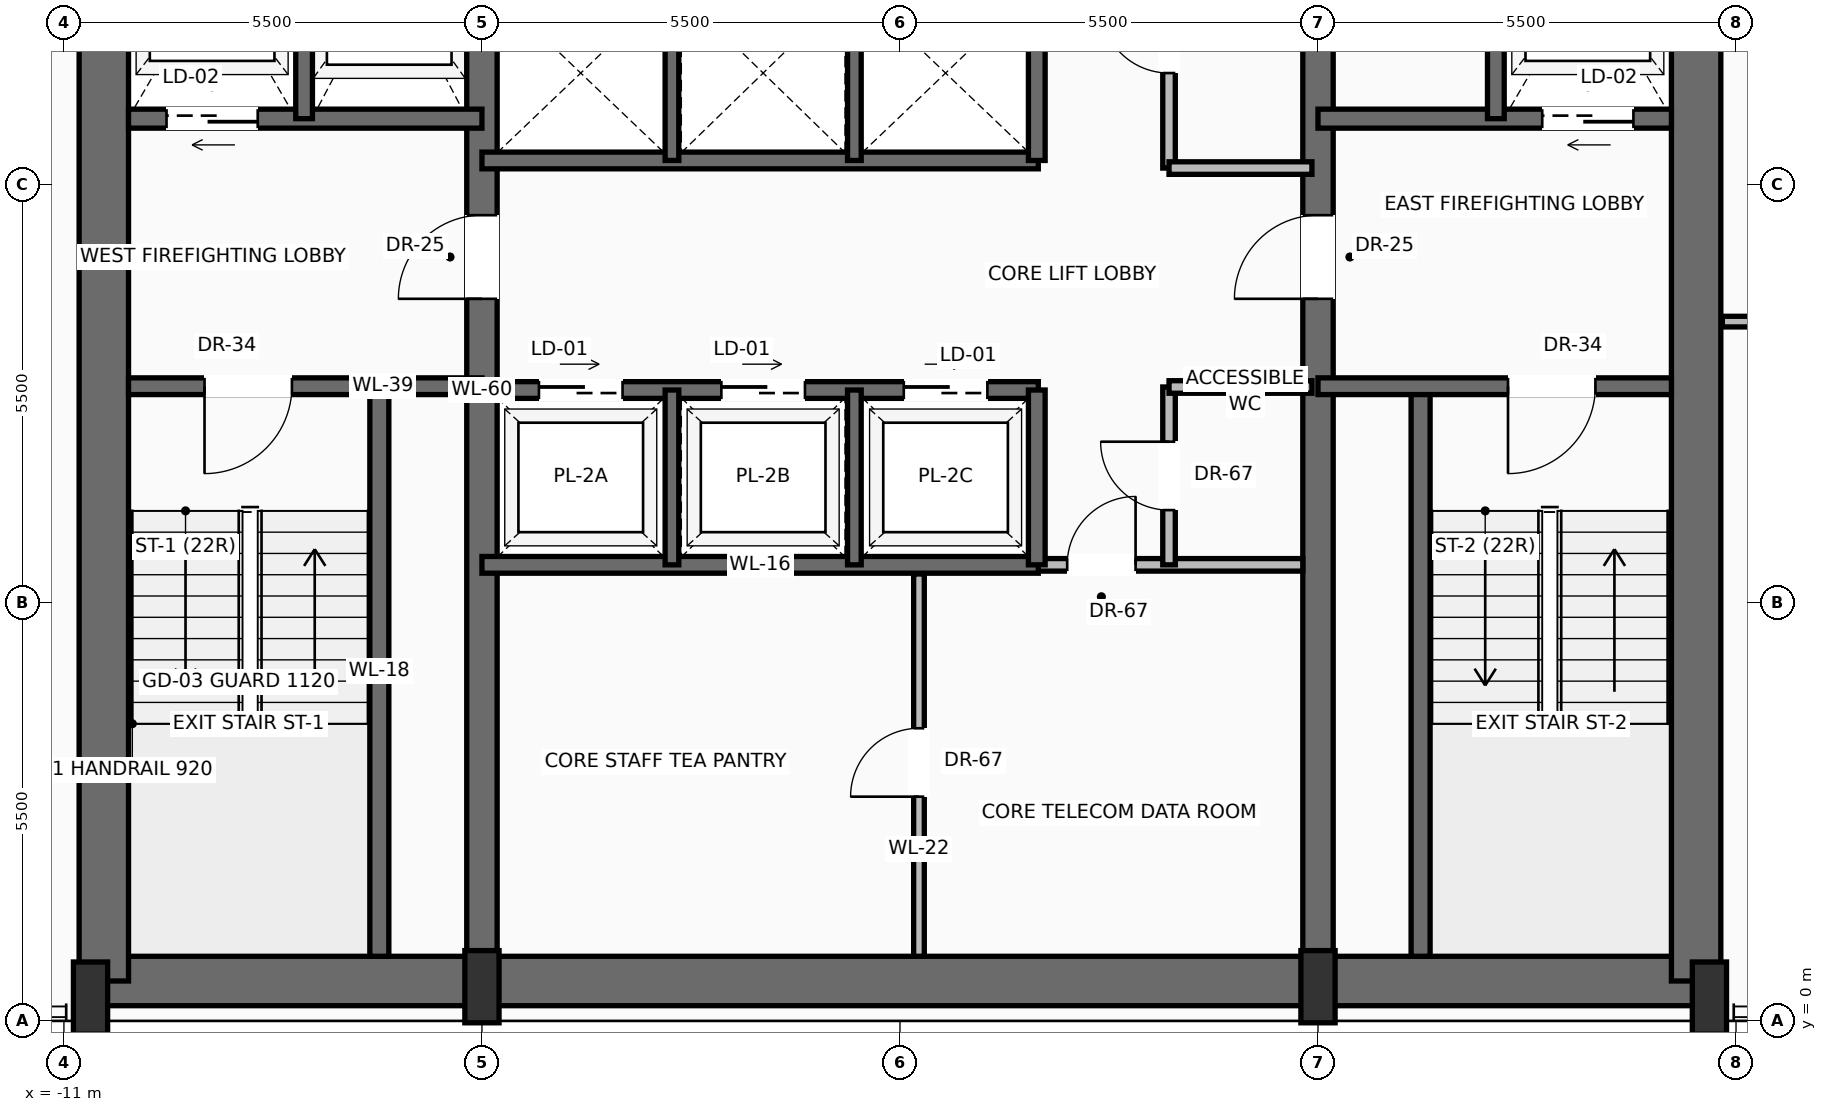
"""IFC4 building model, lengths in metres.
Left out: names, types, materials, properties, quantities, classifications, styles, units other than length and angle.
Written with IfcOpenShell. Run it as: python <this file> out.ifc"""

import sys

from ifc_helpers import new_model, si_unit, direction, frame, frame_2d, origin, origin_2d, place, context, subcontext, project, spatial, rectangle, extrude, source, transform, mapped, element, fill, save


model = new_model("IFC4")
c1 = context("Model", 3, precision=1e-05, world=origin(), true_north=direction((0.0, 1.0)))
c2 = subcontext(c1, "Body", "Model", "MODEL_VIEW")
j1 = project(units=[si_unit("LENGTHUNIT", "METRE"), si_unit("PLANEANGLEUNIT", "RADIAN")], contexts=[c1])
p1 = place(None, origin())
s1 = spatial("IfcSite", under=j1, at=p1, CompositionType="ELEMENT")
p2 = place(p1, origin())
s2 = spatial("IfcBuilding", under=s1, at=p2, CompositionType="ELEMENT")
p3 = place(p2, frame((0.0, 0.0, 171.0)))
s3 = spatial("IfcBuildingStorey", under=s2, at=p3, CompositionType="ELEMENT", Elevation=171.0)
p4 = place(p3, frame((-10.65, 0.525, 0.0), z_axis=(0.0, 0.0, 1.0), x_axis=(1.0, 0.0, 0.0)))
e1 = element("IfcWall", 1, at=p4, inside=s3, PredefinedType="SHEAR", context=c2, shape_type="SweptSolid", body=[
    extrude(rectangle(XDim=21.3, YDim=0.65, at=frame_2d((10.65, 0.0))), origin(), (0.0, 0.0, 1.0), 3.47),
])
for number, where, z_axis, x_axis in (
    (2, (-10.475, 0.525, 0.0), (0.0, 0.0, 1.0), (0.0, 1.0, 0.0)),
    (3, (10.475, 0.525, 0.0), (0.0, 0.0, 1.0), (0.0, 1.0, 0.0)),
):
    element("IfcWall", number, at=place(p3, frame(where, z_axis=z_axis, x_axis=x_axis)), inside=s3, PredefinedType="SHEAR", context=c2, shape_type="SweptSolid", body=[
        extrude(rectangle(XDim=15.55, YDim=0.65, at=frame_2d((7.775, 0.0))), origin(), (0.0, 0.0, 1.0), 3.47),
    ])
p5 = place(p3, frame((-5.5, 0.525, 0.0), z_axis=(0.0, 0.0, 1.0), x_axis=(0.0, 1.0, 0.0)))
e4 = element("IfcWall", 4, at=p5, inside=s3, PredefinedType="SHEAR", context=c2, shape_type="SweptSolid", body=[
    extrude(rectangle(XDim=15.55, YDim=0.4, at=frame_2d((7.775, 0.0))), origin(), (0.0, 0.0, 1.0), 3.47),
])
p6 = place(p5, frame((8.975, 0.0, 0.0)))
e5 = element("IfcOpeningElement", 5, at=p6, cuts=e4, PredefinedType="OPENING", context=c2, shape_type="SweptSolid", body=[
    extrude(rectangle(XDim=1.1, YDim=2.2, at=frame_2d((0.55, 1.1))), frame((0.0, 0.21, 0.0), z_axis=(0.0, -1.0, 0.0), x_axis=(1.0, 0.0, 0.0)), (0.0, 0.0, 1.0), 0.42),
])
p7 = place(p3, frame((5.5, 0.525, 0.0), z_axis=(0.0, 0.0, 1.0), x_axis=(0.0, 1.0, 0.0)))
e6 = element("IfcWall", 6, at=p7, inside=s3, PredefinedType="SHEAR", context=c2, shape_type="SweptSolid", body=[
    extrude(rectangle(XDim=15.55, YDim=0.4, at=frame_2d((7.775, 0.0))), origin(), (0.0, 0.0, 1.0), 3.47),
])
p8 = place(p7, frame((8.975, 0.0, 0.0)))
e7 = element("IfcOpeningElement", 7, at=p8, cuts=e6, PredefinedType="OPENING", context=c2, shape_type="SweptSolid", body=[
    extrude(rectangle(XDim=1.1, YDim=2.2, at=frame_2d((0.55, 1.1))), frame((0.0, 0.21, 0.0), z_axis=(0.0, -1.0, 0.0), x_axis=(1.0, 0.0, 0.0)), (0.0, 0.0, 1.0), 0.42),
])
m1 = source(origin(), c2, "Body", "SweptSolid", [
    extrude(rectangle(XDim=0.45, YDim=0.95, at=origin_2d()), origin(), (0.0, 0.0, 1.0), 3.7),
])
for number, where, z_axis, x_axis in (
    (8, (-10.65, 0.3, 0.0), (0.0, 0.0, 1.0), (1.0, 0.0, 0.0)),
    (9, (-5.5, 0.45, 0.0), (0.0, 0.0, 1.0), (1.0, 0.0, 0.0)),
    (10, (5.5, 0.45, 0.0), (0.0, 0.0, 1.0), (1.0, 0.0, 0.0)),
    (11, (10.65, 0.3, 0.0), (0.0, 0.0, 1.0), (1.0, 0.0, 0.0)),
):
    element("IfcColumn", number, at=place(p3, frame(where, z_axis=z_axis, x_axis=x_axis)), inside=s3, PredefinedType="PILASTER", context=c2, shape_type="MappedRepresentation", body=[
        mapped(m1, transform((0.0, 0.0, 0.0), scale=1.0)),
    ])
p9 = place(p3, frame((-6.85, 0.85, 0.0), z_axis=(0.0, 0.0, 1.0), x_axis=(0.0, 1.0, 0.0)))
e12 = element("IfcWall", 12, at=p9, inside=s3, PredefinedType="SOLIDWALL", context=c2, shape_type="SweptSolid", body=[
    extrude(rectangle(XDim=7.5, YDim=0.25, at=frame_2d((3.75, 0.0))), origin(), (0.0, 0.0, 1.0), 3.47),
])
p10 = place(p3, frame((-5.5, 8.35, 0.0), z_axis=(0.0, 0.0, 1.0), x_axis=(-1.0, 0.0, 0.0)))
e13 = element("IfcWall", 13, at=p10, inside=s3, PredefinedType="SOLIDWALL", context=c2, shape_type="SweptSolid", body=[
    extrude(rectangle(XDim=4.65, YDim=0.22, at=frame_2d((2.325, 0.0))), origin(), (0.0, 0.0, 1.0), 3.47),
])
p11 = place(p10, frame((2.5, 0.0, 0.0)))
e14 = element("IfcOpeningElement", 14, at=p11, cuts=e13, PredefinedType="OPENING", context=c2, shape_type="SweptSolid", body=[
    extrude(rectangle(XDim=1.15, YDim=2.2, at=frame_2d((0.575, 1.1))), frame((0.0, 0.12, 0.0), z_axis=(0.0, -1.0, 0.0), x_axis=(1.0, 0.0, 0.0)), (0.0, 0.0, 1.0), 0.24),
])
p12 = place(p3, frame((-5.5, 11.87, 0.0), z_axis=(0.0, 0.0, 1.0), x_axis=(-1.0, 0.0, 0.0)))
e15 = element("IfcWall", 15, at=p12, inside=s3, PredefinedType="SOLIDWALL", context=c2, shape_type="SweptSolid", body=[
    extrude(rectangle(XDim=4.65, YDim=0.25, at=frame_2d((2.325, 0.0))), origin(), (0.0, 0.0, 1.0), 3.47),
])
p13 = place(p12, frame((2.95, 0.0, 0.0)))
e16 = element("IfcOpeningElement", 16, at=p13, cuts=e15, PredefinedType="OPENING", context=c2, shape_type="SweptSolid", body=[
    extrude(rectangle(XDim=1.2, YDim=2.25, at=frame_2d((0.6, 1.125))), frame((0.0, 0.135, 0.0), z_axis=(0.0, -1.0, 0.0), x_axis=(1.0, 0.0, 0.0)), (0.0, 0.0, 1.0), 0.27),
])
p14 = place(p3, frame((-7.84, 11.87, 0.0), z_axis=(0.0, 0.0, 1.0), x_axis=(0.0, 1.0, 0.0)))
e17 = element("IfcWall", 17, at=p14, inside=s3, PredefinedType="SOLIDWALL", context=c2, shape_type="SweptSolid", body=[
    extrude(rectangle(XDim=3.88, YDim=0.22, at=frame_2d((1.94, 0.0))), origin(), (0.0, 0.0, 1.0), 3.47),
])
p15 = place(p3, frame((6.85, 0.85, 0.0), z_axis=(0.0, 0.0, 1.0), x_axis=(0.0, 1.0, 0.0)))
e18 = element("IfcWall", 18, at=p15, inside=s3, PredefinedType="SOLIDWALL", context=c2, shape_type="SweptSolid", body=[
    extrude(rectangle(XDim=7.5, YDim=0.25, at=frame_2d((3.75, 0.0))), origin(), (0.0, 0.0, 1.0), 3.47),
])
p16 = place(p3, frame((10.15, 8.35, 0.0), z_axis=(0.0, 0.0, 1.0), x_axis=(-1.0, 0.0, 0.0)))
e19 = element("IfcWall", 19, at=p16, inside=s3, PredefinedType="SOLIDWALL", context=c2, shape_type="SweptSolid", body=[
    extrude(rectangle(XDim=4.65, YDim=0.22, at=frame_2d((2.325, 0.0))), origin(), (0.0, 0.0, 1.0), 3.47),
])
p17 = place(p16, frame((1.0, 0.0, 0.0)))
e20 = element("IfcOpeningElement", 20, at=p17, cuts=e19, PredefinedType="OPENING", context=c2, shape_type="SweptSolid", body=[
    extrude(rectangle(XDim=1.15, YDim=2.2, at=frame_2d((0.575, 1.1))), frame((0.0, 0.12, 0.0), z_axis=(0.0, -1.0, 0.0), x_axis=(1.0, 0.0, 0.0)), (0.0, 0.0, 1.0), 0.24),
])
p18 = place(p3, frame((10.15, 11.87, 0.0), z_axis=(0.0, 0.0, 1.0), x_axis=(-1.0, 0.0, 0.0)))
e21 = element("IfcWall", 21, at=p18, inside=s3, PredefinedType="SOLIDWALL", context=c2, shape_type="SweptSolid", body=[
    extrude(rectangle(XDim=4.65, YDim=0.25, at=frame_2d((2.325, 0.0))), origin(), (0.0, 0.0, 1.0), 3.47),
])
p19 = place(p18, frame((0.5, 0.0, 0.0)))
e22 = element("IfcOpeningElement", 22, at=p19, cuts=e21, PredefinedType="OPENING", context=c2, shape_type="SweptSolid", body=[
    extrude(rectangle(XDim=1.2, YDim=2.25, at=frame_2d((0.6, 1.125))), frame((0.0, 0.135, 0.0), z_axis=(0.0, -1.0, 0.0), x_axis=(1.0, 0.0, 0.0)), (0.0, 0.0, 1.0), 0.27),
])
p20 = place(p3, frame((7.84, 11.87, 0.0), z_axis=(0.0, 0.0, 1.0), x_axis=(0.0, 1.0, 0.0)))
e23 = element("IfcWall", 23, at=p20, inside=s3, PredefinedType="SOLIDWALL", context=c2, shape_type="SweptSolid", body=[
    extrude(rectangle(XDim=3.88, YDim=0.22, at=frame_2d((1.94, 0.0))), origin(), (0.0, 0.0, 1.0), 3.47),
])
p21 = place(p3, frame((1.82, 6.0, 0.0), z_axis=(0.0, 0.0, 1.0), x_axis=(1.0, 0.0, 0.0)))
e24 = element("IfcWall", 24, at=p21, inside=s3, PredefinedType="PARTITIONING", context=c2, shape_type="SweptSolid", body=[
    extrude(rectangle(XDim=3.48, YDim=0.165, at=frame_2d((1.74, 0.0))), origin(), (0.0, 0.0, 1.0), 3.462),
])
p22 = place(p21, frame((0.38, 0.0, 0.0)))
e25 = element("IfcOpeningElement", 25, at=p22, cuts=e24, PredefinedType="OPENING", context=c2, shape_type="SweptSolid", body=[
    extrude(rectangle(XDim=0.9, YDim=2.1, at=frame_2d((0.45, 1.05))), frame((0.0, 0.093, 0.0), z_axis=(0.0, -1.0, 0.0), x_axis=(1.0, 0.0, 0.0)), (0.0, 0.0, 1.0), 0.185),
])
p23 = place(p3, frame((0.25, 0.85, 0.0), z_axis=(0.0, 0.0, 1.0), x_axis=(0.0, 1.0, 0.0)))
e26 = element("IfcWall", 26, at=p23, inside=s3, PredefinedType="PARTITIONING", context=c2, shape_type="SweptSolid", body=[
    extrude(rectangle(XDim=5.03, YDim=0.14, at=frame_2d((2.515, 0.0))), origin(), (0.0, 0.0, 1.0), 3.462),
])
p24 = place(p23, frame((2.1, 0.0, 0.0)))
e27 = element("IfcOpeningElement", 27, at=p24, cuts=e26, PredefinedType="OPENING", context=c2, shape_type="SweptSolid", body=[
    extrude(rectangle(XDim=0.9, YDim=2.1, at=frame_2d((0.45, 1.05))), frame((0.0, 0.08, 0.0), z_axis=(0.0, -1.0, 0.0), x_axis=(1.0, 0.0, 0.0)), (0.0, 0.0, 1.0), 0.16),
])
p25 = place(p3, frame((3.54, 6.0, 0.0), z_axis=(0.0, 0.0, 1.0), x_axis=(0.0, 1.0, 0.0)))
e28 = element("IfcWall", 28, at=p25, inside=s3, PredefinedType="PARTITIONING", context=c2, shape_type="SweptSolid", body=[
    extrude(rectangle(XDim=2.34, YDim=0.165, at=frame_2d((1.17, 0.0))), origin(), (0.0, 0.0, 1.0), 3.462),
])
p26 = place(p25, frame((0.72, 0.0, 0.0)))
e29 = element("IfcOpeningElement", 29, at=p26, cuts=e28, PredefinedType="OPENING", context=c2, shape_type="SweptSolid", body=[
    extrude(rectangle(XDim=0.9, YDim=2.1, at=frame_2d((0.45, 1.05))), frame((0.0, 0.093, 0.0), z_axis=(0.0, -1.0, 0.0), x_axis=(1.0, 0.0, 0.0)), (0.0, 0.0, 1.0), 0.185),
])
p27 = place(p3, frame((3.54, 8.34, 0.0), z_axis=(0.0, 0.0, 1.0), x_axis=(1.0, 0.0, 0.0)))
e30 = element("IfcWall", 30, at=p27, inside=s3, PredefinedType="PARTITIONING", context=c2, shape_type="SweptSolid", body=[
    extrude(rectangle(XDim=1.88, YDim=0.165, at=frame_2d((0.94, 0.0))), origin(), (0.0, 0.0, 1.0), 3.462),
])
p28 = place(p3, frame((-5.5, 6.0, 0.0), z_axis=(0.0, 0.0, 1.0), x_axis=(1.0, 0.0, 0.0)))
e31 = element("IfcWall", 31, at=p28, inside=s3, PredefinedType="SOLIDWALL", context=c2, shape_type="SweptSolid", body=[
    extrude(rectangle(XDim=7.32, YDim=0.22, at=frame_2d((3.66, 0.0))), origin(), (0.0, 0.0, 1.0), 3.47),
])
p29 = place(p3, frame((-5.5, 8.3, 0.0), z_axis=(0.0, 0.0, 1.0), x_axis=(1.0, 0.0, 0.0)))
e32 = element("IfcWall", 32, at=p29, inside=s3, PredefinedType="SOLIDWALL", context=c2, shape_type="SweptSolid", body=[
    extrude(rectangle(XDim=7.32, YDim=0.22, at=frame_2d((3.66, 0.0))), origin(), (0.0, 0.0, 1.0), 3.47),
])
p30 = place(p29, frame((0.75, 0.0, 0.0)))
e33 = element("IfcOpeningElement", 33, at=p30, cuts=e32, PredefinedType="OPENING", context=c2, shape_type="SweptSolid", body=[
    extrude(rectangle(XDim=1.1, YDim=2.2, at=frame_2d((0.55, 1.1))), frame((0.0, 0.12, 0.0), z_axis=(0.0, -1.0, 0.0), x_axis=(1.0, 0.0, 0.0)), (0.0, 0.0, 1.0), 0.24),
])
p31 = place(p29, frame((3.15, 0.0, 0.0)))
e34 = element("IfcOpeningElement", 34, at=p31, cuts=e32, PredefinedType="OPENING", context=c2, shape_type="SweptSolid", body=[
    extrude(rectangle(XDim=1.1, YDim=2.2, at=frame_2d((0.55, 1.1))), frame((0.0, 0.12, 0.0), z_axis=(0.0, -1.0, 0.0), x_axis=(1.0, 0.0, 0.0)), (0.0, 0.0, 1.0), 0.24),
])
p32 = place(p29, frame((5.55, 0.0, 0.0)))
e35 = element("IfcOpeningElement", 35, at=p32, cuts=e32, PredefinedType="OPENING", context=c2, shape_type="SweptSolid", body=[
    extrude(rectangle(XDim=1.1, YDim=2.2, at=frame_2d((0.55, 1.1))), frame((0.0, 0.12, 0.0), z_axis=(0.0, -1.0, 0.0), x_axis=(1.0, 0.0, 0.0)), (0.0, 0.0, 1.0), 0.24),
])
p33 = place(p3, frame((1.8, 6.0, 0.0), z_axis=(0.0, 0.0, 1.0), x_axis=(0.0, 1.0, 0.0)))
e36 = element("IfcWall", 36, at=p33, inside=s3, PredefinedType="SOLIDWALL", context=c2, shape_type="SweptSolid", body=[
    extrude(rectangle(XDim=2.3, YDim=0.22, at=frame_2d((1.15, 0.0))), origin(), (0.0, 0.0, 1.0), 3.47),
])
for number, where, z_axis, x_axis in (
    (37, (-3.0, 6.0, 0.0), (0.0, 0.0, 1.0), (0.0, 1.0, 0.0)),
    (38, (-0.6, 6.0, 0.0), (0.0, 0.0, 1.0), (0.0, 1.0, 0.0)),
):
    element("IfcWall", number, at=place(p3, frame(where, z_axis=z_axis, x_axis=x_axis)), inside=s3, PredefinedType="SOLIDWALL", context=c2, shape_type="SweptSolid", body=[
        extrude(rectangle(XDim=2.3, YDim=0.18, at=frame_2d((1.15, 0.0))), origin(), (0.0, 0.0, 1.0), 3.47),
    ])
p34 = place(p3, frame((-5.5, 11.32, 0.0), z_axis=(0.0, 0.0, 1.0), x_axis=(1.0, 0.0, 0.0)))
e39 = element("IfcWall", 39, at=p34, inside=s3, PredefinedType="SOLIDWALL", context=c2, shape_type="SweptSolid", body=[
    extrude(rectangle(XDim=7.32, YDim=0.22, at=frame_2d((3.66, 0.0))), origin(), (0.0, 0.0, 1.0), 3.47),
])
p35 = place(p3, frame((1.8, 11.32, 0.0), z_axis=(0.0, 0.0, 1.0), x_axis=(0.0, 1.0, 0.0)))
e40 = element("IfcWall", 40, at=p35, inside=s3, PredefinedType="SOLIDWALL", context=c2, shape_type="SweptSolid", body=[
    extrude(rectangle(XDim=2.3, YDim=0.22, at=frame_2d((1.15, 0.0))), origin(), (0.0, 0.0, 1.0), 3.47),
])
for number, where, z_axis, x_axis in (
    (41, (-3.0, 11.32, 0.0), (0.0, 0.0, 1.0), (0.0, 1.0, 0.0)),
    (42, (-0.6, 11.32, 0.0), (0.0, 0.0, 1.0), (0.0, 1.0, 0.0)),
):
    element("IfcWall", number, at=place(p3, frame(where, z_axis=z_axis, x_axis=x_axis)), inside=s3, PredefinedType="SOLIDWALL", context=c2, shape_type="SweptSolid", body=[
        extrude(rectangle(XDim=2.3, YDim=0.18, at=frame_2d((1.15, 0.0))), origin(), (0.0, 0.0, 1.0), 3.47),
    ])
p36 = place(p3, frame((3.54, 11.22, 0.0), z_axis=(0.0, 0.0, 1.0), x_axis=(0.0, 1.0, 0.0)))
e43 = element("IfcWall", 43, at=p36, inside=s3, PredefinedType="PARTITIONING", context=c2, shape_type="SweptSolid", body=[
    extrude(rectangle(XDim=4.53, YDim=0.165, at=frame_2d((2.265, 0.0))), origin(), (0.0, 0.0, 1.0), 3.462),
])
p37 = place(p36, frame((1.25, 0.0, 0.0)))
e44 = element("IfcOpeningElement", 44, at=p37, cuts=e43, PredefinedType="OPENING", context=c2, shape_type="SweptSolid", body=[
    extrude(rectangle(XDim=0.9, YDim=2.1, at=frame_2d((0.45, 1.05))), frame((0.0, 0.093, 0.0), z_axis=(0.0, -1.0, 0.0), x_axis=(1.0, 0.0, 0.0)), (0.0, 0.0, 1.0), 0.185),
])
p38 = place(p3, frame((3.54, 11.22, 0.0), z_axis=(0.0, 0.0, 1.0), x_axis=(1.0, 0.0, 0.0)))
e45 = element("IfcWall", 45, at=p38, inside=s3, PredefinedType="PARTITIONING", context=c2, shape_type="SweptSolid", body=[
    extrude(rectangle(XDim=1.88, YDim=0.165, at=frame_2d((0.94, 0.0))), origin(), (0.0, 0.0, 1.0), 3.462),
])
p39 = place(p3, frame((10.82, 9.2, 0.0), z_axis=(0.0, 0.0, 1.0), x_axis=(1.0, 0.0, 0.0)))
e46 = element("IfcWall", 46, at=p39, inside=s3, PredefinedType="PARTITIONING", context=c2, shape_type="SweptSolid", body=[
    extrude(rectangle(XDim=14.522, YDim=0.14, at=frame_2d((7.261, 0.0))), origin(), (0.0, 0.0, 1.0), 3.462),
])
p40 = place(p39, frame((6.778, 0.0, 0.0)))
e47 = element("IfcOpeningElement", 47, at=p40, cuts=e46, PredefinedType="OPENING", context=c2, shape_type="SweptSolid", body=[
    extrude(rectangle(XDim=0.95, YDim=2.2, at=frame_2d((0.475, 1.1))), frame((0.0, 0.08, 0.0), z_axis=(0.0, -1.0, 0.0), x_axis=(1.0, 0.0, 0.0)), (0.0, 0.0, 1.0), 0.16),
])
m2 = source(origin(), c2, "Body", "SweptSolid", [
    extrude(rectangle(XDim=1.15, YDim=2.2, at=frame_2d((0.575, 1.1))), frame((0.0, 0.025, 0.0), z_axis=(0.0, -1.0, 0.0), x_axis=(1.0, 0.0, 0.0)), (0.0, 0.0, 1.0), 0.05),
])
p41 = place(p11, origin())
e48 = element("IfcDoor", 48, at=p41, inside=s3, OperationType="SINGLE_SWING_RIGHT", PredefinedType="DOOR", context=c2, shape_type="MappedRepresentation", body=[
    mapped(m2, transform((0.0, 0.0, 0.0), scale=1.0)),
])
fill(e14, e48)
m3 = source(origin(), c2, "Body", "SweptSolid", [
    extrude(rectangle(XDim=1.1, YDim=2.2, at=frame_2d((0.55, 1.1))), frame((0.0, 0.025, 0.0), z_axis=(0.0, -1.0, 0.0), x_axis=(1.0, 0.0, 0.0)), (0.0, 0.0, 1.0), 0.05),
])
p42 = place(p6, origin())
e49 = element("IfcDoor", 49, at=p42, inside=s3, OperationType="SINGLE_SWING_LEFT", PredefinedType="DOOR", context=c2, shape_type="MappedRepresentation", body=[
    mapped(m3, transform((0.0, 0.0, 0.0), scale=1.0)),
])
fill(e5, e49)
m4 = source(origin(), c2, "Body", "SweptSolid", [
    extrude(rectangle(XDim=1.2, YDim=2.25, at=frame_2d((0.6, 1.125))), frame((0.0, 0.025, 0.0), z_axis=(0.0, -1.0, 0.0), x_axis=(1.0, 0.0, 0.0)), (0.0, 0.0, 1.0), 0.05),
])
p43 = place(p13, origin())
e50 = element("IfcDoor", 50, at=p43, inside=s3, OperationType="SLIDING_TO_LEFT", PredefinedType="DOOR", context=c2, shape_type="MappedRepresentation", body=[
    mapped(m4, transform((0.0, 0.0, 0.0), scale=1.0)),
])
fill(e16, e50)
p44 = place(p17, origin())
e51 = element("IfcDoor", 51, at=p44, inside=s3, OperationType="SINGLE_SWING_RIGHT", PredefinedType="DOOR", context=c2, shape_type="MappedRepresentation", body=[
    mapped(m2, transform((0.0, 0.0, 0.0), scale=1.0)),
])
fill(e20, e51)
p45 = place(p8, origin())
e52 = element("IfcDoor", 52, at=p45, inside=s3, OperationType="SINGLE_SWING_LEFT", PredefinedType="DOOR", context=c2, shape_type="MappedRepresentation", body=[
    mapped(m3, transform((0.0, 0.0, 0.0), scale=1.0)),
])
fill(e7, e52)
p46 = place(p19, origin())
e53 = element("IfcDoor", 53, at=p46, inside=s3, OperationType="SLIDING_TO_RIGHT", PredefinedType="DOOR", context=c2, shape_type="MappedRepresentation", body=[
    mapped(m4, transform((0.0, 0.0, 0.0), scale=1.0)),
])
fill(e22, e53)
m5 = source(origin(), c2, "Body", "SweptSolid", [
    extrude(rectangle(XDim=0.9, YDim=2.1, at=frame_2d((0.45, 1.05))), frame((0.0, 0.025, 0.0), z_axis=(0.0, -1.0, 0.0), x_axis=(1.0, 0.0, 0.0)), (0.0, 0.0, 1.0), 0.05),
])
p47 = place(p22, origin())
e54 = element("IfcDoor", 54, at=p47, inside=s3, OperationType="SINGLE_SWING_RIGHT", PredefinedType="DOOR", context=c2, shape_type="MappedRepresentation", body=[
    mapped(m5, transform((0.0, 0.0, 0.0), scale=1.0)),
])
fill(e25, e54)
p48 = place(p24, origin())
e55 = element("IfcDoor", 55, at=p48, inside=s3, OperationType="SINGLE_SWING_LEFT", PredefinedType="DOOR", context=c2, shape_type="MappedRepresentation", body=[
    mapped(m5, transform((0.0, 0.0, 0.0), scale=1.0)),
])
fill(e27, e55)
p49 = place(p26, origin())
e56 = element("IfcDoor", 56, at=p49, inside=s3, OperationType="SINGLE_SWING_RIGHT", PredefinedType="DOOR", context=c2, shape_type="MappedRepresentation", body=[
    mapped(m5, transform((0.0, 0.0, 0.0), scale=1.0)),
])
fill(e29, e56)
m6 = source(origin(), c2, "Body", "SweptSolid", [
    extrude(rectangle(XDim=1.1, YDim=2.2, at=frame_2d((0.55, 1.1))), frame((0.0, 0.025, 0.0), z_axis=(0.0, -1.0, 0.0), x_axis=(1.0, 0.0, 0.0)), (0.0, 0.0, 1.0), 0.05),
])
p50 = place(p30, origin())
e57 = element("IfcDoor", 57, at=p50, inside=s3, OperationType="SLIDING_TO_LEFT", PredefinedType="DOOR", context=c2, shape_type="MappedRepresentation", body=[
    mapped(m6, transform((0.0, 0.0, 0.0), scale=1.0)),
])
fill(e33, e57)
p51 = place(p31, origin())
e58 = element("IfcDoor", 58, at=p51, inside=s3, OperationType="SLIDING_TO_LEFT", PredefinedType="DOOR", context=c2, shape_type="MappedRepresentation", body=[
    mapped(m6, transform((0.0, 0.0, 0.0), scale=1.0)),
])
fill(e34, e58)
p52 = place(p32, origin())
e59 = element("IfcDoor", 59, at=p52, inside=s3, OperationType="SLIDING_TO_LEFT", PredefinedType="DOOR", context=c2, shape_type="MappedRepresentation", body=[
    mapped(m6, transform((0.0, 0.0, 0.0), scale=1.0)),
])
fill(e35, e59)
p53 = place(p37, origin())
e60 = element("IfcDoor", 60, at=p53, inside=s3, OperationType="SINGLE_SWING_RIGHT", PredefinedType="DOOR", context=c2, shape_type="MappedRepresentation", body=[
    mapped(m5, transform((0.0, 0.0, 0.0), scale=1.0)),
])
fill(e44, e60)
save(model, sys.argv[1])
